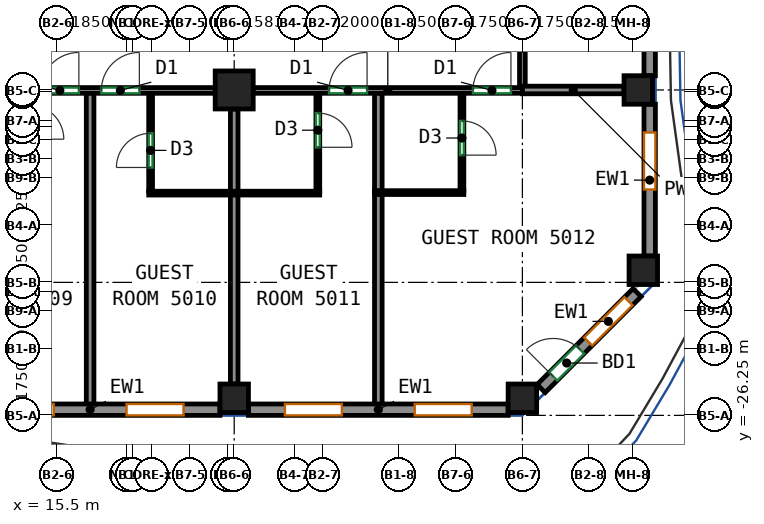
"""IFC4 building model, lengths in metres.
Left out: names, types, materials, properties, quantities, classifications, styles, units other than length and angle.
Written with IfcOpenShell. Run it as: python <this file> out.ifc"""

import sys

from ifc_helpers import new_model, si_unit, direction, frame, frame_2d, origin, origin_2d, place, context, subcontext, project, spatial, rectangle, extrude, source, transform, mapped, element, fill, save


model = new_model("IFC4")
c1 = context("Model", 3, precision=1e-05, world=origin(), true_north=direction((0.0, 1.0)))
c2 = subcontext(c1, "Body", "Model", "MODEL_VIEW")
j1 = project(units=[si_unit("LENGTHUNIT", "METRE"), si_unit("PLANEANGLEUNIT", "RADIAN")], contexts=[c1])
p1 = place(None, origin())
s1 = spatial("IfcSite", under=j1, at=p1, CompositionType="ELEMENT")
p2 = place(p1, origin())
s2 = spatial("IfcBuilding", under=s1, at=p2, CompositionType="ELEMENT")
p3 = place(p2, frame((0.0, 0.0, 206.7)))
s3 = spatial("IfcBuildingStorey", under=s2, at=p3, CompositionType="ELEMENT", Elevation=206.7)
m1 = source(origin(), c2, "Body", "SweptSolid", [
    extrude(rectangle(XDim=0.75, YDim=0.75, at=origin_2d()), origin(), (0.0, 0.0, 1.0), 3.12),
])
p4 = place(p3, frame((20.167, -25.8, 0.0), z_axis=(0.0, 0.0, 1.0), x_axis=(1.0, 0.0, 0.0)))
e1 = element("IfcColumn", 1, at=p4, inside=s3, PredefinedType="COLUMN", context=c2, shape_type="MappedRepresentation", body=[
    mapped(m1, transform((0.0, 0.0, 0.0))),
])
m2 = source(origin(), c2, "Body", "SweptSolid", [
    extrude(rectangle(XDim=1.0, YDim=1.0, at=origin_2d()), origin(), (0.0, 0.0, 1.0), 3.12),
])
p5 = place(p3, frame((20.167, -17.688, 0.0), z_axis=(0.0, 0.0, 1.0), x_axis=(1.0, 0.0, 0.0)))
e2 = element("IfcColumn", 2, at=p5, inside=s3, PredefinedType="COLUMN", context=c2, shape_type="MappedRepresentation", body=[
    mapped(m2, transform((0.0, 0.0, 0.0))),
])
for number, where, z_axis, x_axis in (
    (3, (27.75, -25.8, 0.0), (0.0, 0.0, 1.0), (1.0, 0.0, 0.0)),
    (4, (30.8, -17.688, 0.0), (0.0, 0.0, 1.0), (1.0, 0.0, 0.0)),
    (5, (30.932, -22.432, 0.0), (0.0, 0.0, 1.0), (1.0, 0.0, 0.0)),
):
    element("IfcColumn", number, at=place(p3, frame(where, z_axis=z_axis, x_axis=x_axis)), inside=s3, PredefinedType="COLUMN", context=c2, shape_type="MappedRepresentation", body=[
        mapped(m1, transform((0.0, 0.0, 0.0))),
    ])
m3 = source(origin(), c2, "Body", "SweptSolid", [
    extrude(rectangle(XDim=6.833, YDim=0.3, at=frame_2d((3.417, 0.0))), origin(), (0.0, 0.0, 1.0), 3.12),
])
p6 = place(p3, frame((12.958, -26.1, 0.0), z_axis=(0.0, 0.0, 1.0), x_axis=(1.0, 0.0, 0.0)))
e6 = element("IfcWall", 6, at=p6, inside=s3, PredefinedType="SOLIDWALL", context=c2, shape_type="MappedRepresentation", body=[
    mapped(m3, transform((0.0, 0.0, 0.0))),
])
p7 = place(p6, frame((0.958, 0.0, 0.85)))
e7 = element("IfcOpeningElement", 7, at=p7, cuts=e6, PredefinedType="OPENING", context=c2, shape_type="SweptSolid", body=[
    extrude(rectangle(XDim=1.5, YDim=1.95, at=frame_2d((0.75, 0.975))), frame((0.0, 0.16, 0.0), z_axis=(0.0, -1.0, 0.0), x_axis=(1.0, 0.0, 0.0)), (0.0, 0.0, 1.0), 0.32),
])
p8 = place(p6, frame((4.375, 0.0, 0.85)))
e8 = element("IfcOpeningElement", 8, at=p8, cuts=e6, PredefinedType="OPENING", context=c2, shape_type="SweptSolid", body=[
    extrude(rectangle(XDim=1.5, YDim=1.95, at=frame_2d((0.75, 0.975))), frame((0.0, 0.16, 0.0), z_axis=(0.0, -1.0, 0.0), x_axis=(1.0, 0.0, 0.0)), (0.0, 0.0, 1.0), 0.32),
])
m4 = source(origin(), c2, "Body", "SweptSolid", [
    extrude(rectangle(XDim=6.833, YDim=0.3, at=frame_2d((3.417, 0.0))), origin(), (0.0, 0.0, 1.0), 3.12),
])
p9 = place(p3, frame((20.542, -26.1, 0.0), z_axis=(0.0, 0.0, 1.0), x_axis=(1.0, 0.0, 0.0)))
e9 = element("IfcWall", 9, at=p9, inside=s3, PredefinedType="SOLIDWALL", context=c2, shape_type="MappedRepresentation", body=[
    mapped(m4, transform((0.0, 0.0, 0.0))),
])
p10 = place(p9, frame((0.958, 0.0, 0.85)))
e10 = element("IfcOpeningElement", 10, at=p10, cuts=e9, PredefinedType="OPENING", context=c2, shape_type="SweptSolid", body=[
    extrude(rectangle(XDim=1.5, YDim=1.95, at=frame_2d((0.75, 0.975))), frame((0.0, 0.16, 0.0), z_axis=(0.0, -1.0, 0.0), x_axis=(1.0, 0.0, 0.0)), (0.0, 0.0, 1.0), 0.32),
])
p11 = place(p9, frame((4.375, 0.0, 0.85)))
e11 = element("IfcOpeningElement", 11, at=p11, cuts=e9, PredefinedType="OPENING", context=c2, shape_type="SweptSolid", body=[
    extrude(rectangle(XDim=1.5, YDim=1.95, at=frame_2d((0.75, 0.975))), frame((0.0, 0.16, 0.0), z_axis=(0.0, -1.0, 0.0), x_axis=(1.0, 0.0, 0.0)), (0.0, 0.0, 1.0), 0.32),
])
m5 = source(origin(), c2, "Body", "SweptSolid", [
    extrude(rectangle(XDim=3.571, YDim=0.3, at=frame_2d((1.786, 0.0))), origin(), (0.0, 0.0, 1.0), 3.12),
])
p12 = place(p3, frame((28.244, -25.544, 0.0), z_axis=(0.0, 0.0, 1.0), x_axis=(0.707072595841, 0.707140964879, 0.0)))
e12 = element("IfcWall", 12, at=p12, inside=s3, PredefinedType="SOLIDWALL", context=c2, shape_type="MappedRepresentation", body=[
    mapped(m5, transform((0.0, 0.0, 0.0))),
])
p13 = place(p12, frame((1.75, 0.0, 0.85)))
e13 = element("IfcOpeningElement", 13, at=p13, cuts=e12, PredefinedType="OPENING", context=c2, shape_type="SweptSolid", body=[
    extrude(rectangle(XDim=1.5, YDim=1.95, at=frame_2d((0.75, 0.975))), frame((0.0, 0.16, 0.0), z_axis=(0.0, -1.0, 0.0), x_axis=(1.0, 0.0, 0.0)), (0.0, 0.0, 1.0), 0.32),
])
p14 = place(p12, frame((0.45, 0.0, 0.0)))
e14 = element("IfcOpeningElement", 14, at=p14, cuts=e12, PredefinedType="OPENING", context=c2, shape_type="SweptSolid", body=[
    extrude(rectangle(XDim=1.0, YDim=2.1, at=frame_2d((0.5, 1.05))), frame((0.0, 0.16, 0.0), z_axis=(0.0, -1.0, 0.0), x_axis=(1.0, 0.0, 0.0)), (0.0, 0.0, 1.0), 0.32),
])
m6 = source(origin(), c2, "Body", "SweptSolid", [
    extrude(rectangle(XDim=3.994, YDim=0.3, at=frame_2d((1.997, 0.0))), origin(), (0.0, 0.0, 1.0), 3.12),
])
p15 = place(p3, frame((31.1, -22.057, 0.0), z_axis=(0.0, 0.0, 1.0), x_axis=(0.0, 1.0, 0.0)))
e15 = element("IfcWall", 15, at=p15, inside=s3, PredefinedType="SOLIDWALL", context=c2, shape_type="MappedRepresentation", body=[
    mapped(m6, transform((0.0, 0.0, 0.0))),
])
p16 = place(p15, frame((1.75, 0.0, 0.85)))
e16 = element("IfcOpeningElement", 16, at=p16, cuts=e15, PredefinedType="OPENING", context=c2, shape_type="SweptSolid", body=[
    extrude(rectangle(XDim=1.5, YDim=1.95, at=frame_2d((0.75, 0.975))), frame((0.0, 0.16, 0.0), z_axis=(0.0, -1.0, 0.0), x_axis=(1.0, 0.0, 0.0)), (0.0, 0.0, 1.0), 0.32),
])
m7 = source(origin(), c2, "Body", "SweptSolid", [
    extrude(rectangle(XDim=7.812, YDim=0.3, at=frame_2d((3.906, 0.0))), origin(), (0.0, 0.0, 1.0), 3.12),
])
p17 = place(p3, frame((31.1, -17.312, 0.0), z_axis=(0.0, 0.0, 1.0), x_axis=(0.0, 1.0, 0.0)))
e17 = element("IfcWall", 17, at=p17, inside=s3, PredefinedType="SOLIDWALL", context=c2, shape_type="MappedRepresentation", body=[
    mapped(m7, transform((0.0, 0.0, 0.0))),
])
p18 = place(p17, frame((1.75, 0.0, 0.85)))
e18 = element("IfcOpeningElement", 18, at=p18, cuts=e17, PredefinedType="OPENING", context=c2, shape_type="SweptSolid", body=[
    extrude(rectangle(XDim=1.5, YDim=1.95, at=frame_2d((0.75, 0.975))), frame((0.0, 0.16, 0.0), z_axis=(0.0, -1.0, 0.0), x_axis=(1.0, 0.0, 0.0)), (0.0, 0.0, 1.0), 0.32),
])
p19 = place(p17, frame((5.656, 0.0, 0.85)))
e19 = element("IfcOpeningElement", 19, at=p19, cuts=e17, PredefinedType="OPENING", context=c2, shape_type="SweptSolid", body=[
    extrude(rectangle(XDim=1.5, YDim=1.95, at=frame_2d((0.75, 0.975))), frame((0.0, 0.16, 0.0), z_axis=(0.0, -1.0, 0.0), x_axis=(1.0, 0.0, 0.0)), (0.0, 0.0, 1.0), 0.32),
])
p20 = place(p3, frame((13.083, -17.7, 0.0), z_axis=(0.0, 0.0, 1.0), x_axis=(1.0, 0.0, 0.0)))
e20 = element("IfcWall", 20, at=p20, inside=s3, PredefinedType="PARTITIONING", context=c2, shape_type="SweptSolid", body=[
    extrude(rectangle(XDim=6.584, YDim=0.15, at=frame_2d((3.292, 0.0))), origin(), (0.0, 0.0, 1.0), 3.12),
])
p21 = place(p20, frame((1.996, 0.0, 0.0)))
e21 = element("IfcOpeningElement", 21, at=p21, cuts=e20, PredefinedType="OPENING", context=c2, shape_type="SweptSolid", body=[
    extrude(rectangle(XDim=1.0, YDim=2.1, at=frame_2d((0.5, 1.05))), frame((0.0, 0.085, 0.0), z_axis=(0.0, -1.0, 0.0), x_axis=(1.0, 0.0, 0.0)), (0.0, 0.0, 1.0), 0.17),
])
p22 = place(p20, frame((3.588, 0.0, 0.0)))
e22 = element("IfcOpeningElement", 22, at=p22, cuts=e20, PredefinedType="OPENING", context=c2, shape_type="SweptSolid", body=[
    extrude(rectangle(XDim=1.0, YDim=2.1, at=frame_2d((0.5, 1.05))), frame((0.0, 0.085, 0.0), z_axis=(0.0, -1.0, 0.0), x_axis=(1.0, 0.0, 0.0)), (0.0, 0.0, 1.0), 0.17),
])
p23 = place(p3, frame((20.667, -17.7, 0.0), z_axis=(0.0, 0.0, 1.0), x_axis=(1.0, 0.0, 0.0)))
e23 = element("IfcWall", 23, at=p23, inside=s3, PredefinedType="PARTITIONING", context=c2, shape_type="SweptSolid", body=[
    extrude(rectangle(XDim=7.083, YDim=0.15, at=frame_2d((3.542, 0.0))), origin(), (0.0, 0.0, 1.0), 2.52),
])
p24 = place(p23, frame((1.996, 0.0, 0.0)))
e24 = element("IfcOpeningElement", 24, at=p24, cuts=e23, PredefinedType="OPENING", context=c2, shape_type="SweptSolid", body=[
    extrude(rectangle(XDim=1.0, YDim=2.1, at=frame_2d((0.5, 1.05))), frame((0.0, 0.085, 0.0), z_axis=(0.0, -1.0, 0.0), x_axis=(1.0, 0.0, 0.0)), (0.0, 0.0, 1.0), 0.17),
])
p25 = place(p23, frame((5.782, 0.0, 0.0)))
e25 = element("IfcOpeningElement", 25, at=p25, cuts=e23, PredefinedType="OPENING", context=c2, shape_type="SweptSolid", body=[
    extrude(rectangle(XDim=1.0, YDim=2.1, at=frame_2d((0.5, 1.05))), frame((0.0, 0.085, 0.0), z_axis=(0.0, -1.0, 0.0), x_axis=(1.0, 0.0, 0.0)), (0.0, 0.0, 1.0), 0.17),
])
p26 = place(p3, frame((27.75, -17.598, 0.0), z_axis=(0.0, 0.0, 1.0), x_axis=(0.0, 1.0, 0.0)))
e26 = element("IfcWall", 26, at=p26, inside=s3, PredefinedType="PARTITIONING", context=c2, shape_type="SweptSolid", body=[
    extrude(rectangle(XDim=2.023, YDim=0.15, at=frame_2d((1.011, 0.0))), origin(), (0.0, 0.0, 1.0), 2.52),
])
p27 = place(p3, frame((16.375, -26.0, 0.0), z_axis=(0.0, 0.0, 1.0), x_axis=(0.0, 1.0, 0.0)))
e27 = element("IfcWall", 27, at=p27, inside=s3, PredefinedType="PARTITIONING", context=c2, shape_type="SweptSolid", body=[
    extrude(rectangle(XDim=8.223, YDim=0.2, at=frame_2d((4.111, 0.0))), origin(), (0.0, 0.0, 1.0), 3.12),
])
p28 = place(p3, frame((17.967, -20.352, 0.0), z_axis=(0.0, 0.0, 1.0), x_axis=(0.0, 1.0, 0.0)))
e28 = element("IfcWall", 28, at=p28, inside=s3, PredefinedType="PARTITIONING", context=c2, shape_type="SweptSolid", body=[
    extrude(rectangle(XDim=2.575, YDim=0.1, at=frame_2d((1.288, 0.0))), origin(), (0.0, 0.0, 1.0), 3.12),
])
p29 = place(p28, frame((0.625, 0.0, 0.0)))
e29 = element("IfcOpeningElement", 29, at=p29, cuts=e28, PredefinedType="OPENING", context=c2, shape_type="SweptSolid", body=[
    extrude(rectangle(XDim=0.9, YDim=2.1, at=frame_2d((0.45, 1.05))), frame((0.0, 0.06, 0.0), z_axis=(0.0, -1.0, 0.0), x_axis=(1.0, 0.0, 0.0)), (0.0, 0.0, 1.0), 0.12),
])
p30 = place(p3, frame((17.917, -20.402, 0.0), z_axis=(0.0, 0.0, 1.0), x_axis=(1.0, 0.0, 0.0)))
e30 = element("IfcWall", 30, at=p30, inside=s3, PredefinedType="PARTITIONING", context=c2, shape_type="SweptSolid", body=[
    extrude(rectangle(XDim=4.5, YDim=0.1, at=frame_2d((2.25, 0.0))), origin(), (0.0, 0.0, 1.0), 3.12),
])
p31 = place(p3, frame((20.167, -25.425, 0.0), z_axis=(0.0, 0.0, 1.0), x_axis=(0.0, 1.0, 0.0)))
e31 = element("IfcWall", 31, at=p31, inside=s3, PredefinedType="PARTITIONING", context=c2, shape_type="SweptSolid", body=[
    extrude(rectangle(XDim=4.973, YDim=0.2, at=frame_2d((2.487, 0.0))), origin(), (0.0, 0.0, 1.0), 3.12),
])
p32 = place(p3, frame((20.167, -20.352, 0.0), z_axis=(0.0, 0.0, 1.0), x_axis=(0.0, 1.0, 0.0)))
e32 = element("IfcWall", 32, at=p32, inside=s3, PredefinedType="PARTITIONING", context=c2, shape_type="SweptSolid", body=[
    extrude(rectangle(XDim=2.164, YDim=0.2, at=frame_2d((1.082, 0.0))), origin(), (0.0, 0.0, 1.0), 3.12),
])
p33 = place(p3, frame((22.367, -17.777, 0.0), z_axis=(0.0, 0.0, 1.0), x_axis=(0.0, -1.0, 0.0)))
e33 = element("IfcWall", 33, at=p33, inside=s3, PredefinedType="PARTITIONING", context=c2, shape_type="SweptSolid", body=[
    extrude(rectangle(XDim=2.575, YDim=0.1, at=frame_2d((1.288, 0.0))), origin(), (0.0, 0.0, 1.0), 3.12),
])
p34 = place(p33, frame((0.519, 0.0, 0.0)))
e34 = element("IfcOpeningElement", 34, at=p34, cuts=e33, PredefinedType="OPENING", context=c2, shape_type="SweptSolid", body=[
    extrude(rectangle(XDim=0.9, YDim=2.1, at=frame_2d((0.45, 1.05))), frame((0.0, 0.06, 0.0), z_axis=(0.0, -1.0, 0.0), x_axis=(1.0, 0.0, 0.0)), (0.0, 0.0, 1.0), 0.12),
])
p35 = place(p3, frame((23.959, -26.0, 0.0), z_axis=(0.0, 0.0, 1.0), x_axis=(0.0, 1.0, 0.0)))
e35 = element("IfcWall", 35, at=p35, inside=s3, PredefinedType="PARTITIONING", context=c2, shape_type="SweptSolid", body=[
    extrude(rectangle(XDim=5.572, YDim=0.2, at=frame_2d((2.786, 0.0))), origin(), (0.0, 0.0, 1.0), 3.12),
])
p36 = place(p3, frame((23.959, -20.348, 0.0), z_axis=(0.0, 0.0, 1.0), x_axis=(0.0, 1.0, 0.0)))
e36 = element("IfcWall", 36, at=p36, inside=s3, PredefinedType="PARTITIONING", context=c2, shape_type="SweptSolid", body=[
    extrude(rectangle(XDim=2.571, YDim=0.2, at=frame_2d((1.285, 0.0))), origin(), (0.0, 0.0, 1.0), 3.12),
])
p37 = place(p3, frame((23.859, -20.388, 0.0), z_axis=(0.0, 0.0, 1.0), x_axis=(1.0, 0.0, 0.0)))
e37 = element("IfcWall", 37, at=p37, inside=s3, PredefinedType="PARTITIONING", context=c2, shape_type="SweptSolid", body=[
    extrude(rectangle(XDim=2.35, YDim=0.1, at=frame_2d((1.175, 0.0))), origin(), (0.0, 0.0, 1.0), 3.12),
])
p38 = place(p3, frame((26.159, -17.777, 0.0), z_axis=(0.0, 0.0, 1.0), x_axis=(0.0, -1.0, 0.0)))
e38 = element("IfcWall", 38, at=p38, inside=s3, PredefinedType="PARTITIONING", context=c2, shape_type="SweptSolid", body=[
    extrude(rectangle(XDim=2.561, YDim=0.1, at=frame_2d((1.28, 0.0))), origin(), (0.0, 0.0, 1.0), 3.12),
])
p39 = place(p38, frame((0.725, 0.0, 0.0)))
e39 = element("IfcOpeningElement", 39, at=p39, cuts=e38, PredefinedType="OPENING", context=c2, shape_type="SweptSolid", body=[
    extrude(rectangle(XDim=0.9, YDim=2.1, at=frame_2d((0.45, 1.05))), frame((0.0, 0.06, 0.0), z_axis=(0.0, -1.0, 0.0), x_axis=(1.0, 0.0, 0.0)), (0.0, 0.0, 1.0), 0.12),
])
p40 = place(p3, frame((27.752, -17.688, 0.0), z_axis=(0.0, 0.0, 1.0), x_axis=(1.0, 0.0, 0.0)))
e40 = element("IfcWall", 40, at=p40, inside=s3, PredefinedType="PARTITIONING", context=c2, shape_type="SweptSolid", body=[
    extrude(rectangle(XDim=2.673, YDim=0.2, at=frame_2d((1.336, 0.0))), origin(), (0.0, 0.0, 1.0), 2.52),
])
p41 = place(p7, origin())
e41 = element("IfcWindow", 41, at=p41, inside=s3, PartitioningType="SINGLE_PANEL", PredefinedType="WINDOW", context=c2, shape_type="SweptSolid", body=[
    extrude(rectangle(XDim=1.5, YDim=1.95, at=frame_2d((0.75, 0.975))), frame((0.0, 0.03, 0.0), z_axis=(0.0, -1.0, 0.0), x_axis=(1.0, 0.0, 0.0)), (0.0, 0.0, 1.0), 0.06),
])
fill(e7, e41)
p42 = place(p8, origin())
e42 = element("IfcWindow", 42, at=p42, inside=s3, PartitioningType="SINGLE_PANEL", PredefinedType="WINDOW", context=c2, shape_type="SweptSolid", body=[
    extrude(rectangle(XDim=1.5, YDim=1.95, at=frame_2d((0.75, 0.975))), frame((0.0, 0.03, 0.0), z_axis=(0.0, -1.0, 0.0), x_axis=(1.0, 0.0, 0.0)), (0.0, 0.0, 1.0), 0.06),
])
fill(e8, e42)
p43 = place(p10, origin())
e43 = element("IfcWindow", 43, at=p43, inside=s3, PartitioningType="SINGLE_PANEL", PredefinedType="WINDOW", context=c2, shape_type="SweptSolid", body=[
    extrude(rectangle(XDim=1.5, YDim=1.95, at=frame_2d((0.75, 0.975))), frame((0.0, 0.03, 0.0), z_axis=(0.0, -1.0, 0.0), x_axis=(1.0, 0.0, 0.0)), (0.0, 0.0, 1.0), 0.06),
])
fill(e10, e43)
p44 = place(p11, origin())
e44 = element("IfcWindow", 44, at=p44, inside=s3, PartitioningType="SINGLE_PANEL", PredefinedType="WINDOW", context=c2, shape_type="SweptSolid", body=[
    extrude(rectangle(XDim=1.5, YDim=1.95, at=frame_2d((0.75, 0.975))), frame((0.0, 0.03, 0.0), z_axis=(0.0, -1.0, 0.0), x_axis=(1.0, 0.0, 0.0)), (0.0, 0.0, 1.0), 0.06),
])
fill(e11, e44)
p45 = place(p13, origin())
e45 = element("IfcWindow", 45, at=p45, inside=s3, PartitioningType="SINGLE_PANEL", PredefinedType="WINDOW", context=c2, shape_type="SweptSolid", body=[
    extrude(rectangle(XDim=1.5, YDim=1.95, at=frame_2d((0.75, 0.975))), frame((0.0, 0.03, 0.0), z_axis=(0.0, -1.0, 0.0), x_axis=(1.0, 0.0, 0.0)), (0.0, 0.0, 1.0), 0.06),
])
fill(e13, e45)
p46 = place(p14, origin())
e46 = element("IfcDoor", 46, at=p46, inside=s3, OperationType="SINGLE_SWING_LEFT", PredefinedType="DOOR", context=c2, shape_type="SweptSolid", body=[
    extrude(rectangle(XDim=1.0, YDim=2.1, at=frame_2d((0.5, 1.05))), frame((0.0, 0.025, 0.0), z_axis=(0.0, -1.0, 0.0), x_axis=(1.0, 0.0, 0.0)), (0.0, 0.0, 1.0), 0.05),
])
fill(e14, e46)
p47 = place(p16, origin())
e47 = element("IfcWindow", 47, at=p47, inside=s3, PartitioningType="SINGLE_PANEL", PredefinedType="WINDOW", context=c2, shape_type="SweptSolid", body=[
    extrude(rectangle(XDim=1.5, YDim=1.95, at=frame_2d((0.75, 0.975))), frame((0.0, 0.03, 0.0), z_axis=(0.0, -1.0, 0.0), x_axis=(1.0, 0.0, 0.0)), (0.0, 0.0, 1.0), 0.06),
])
fill(e16, e47)
p48 = place(p29, origin())
e48 = element("IfcDoor", 48, at=p48, inside=s3, OperationType="SINGLE_SWING_LEFT", PredefinedType="DOOR", context=c2, shape_type="SweptSolid", body=[
    extrude(rectangle(XDim=0.9, YDim=2.1, at=frame_2d((0.45, 1.05))), frame((0.0, 0.025, 0.0), z_axis=(0.0, -1.0, 0.0), x_axis=(1.0, 0.0, 0.0)), (0.0, 0.0, 1.0), 0.05),
])
fill(e29, e48)
p49 = place(p39, origin())
e49 = element("IfcDoor", 49, at=p49, inside=s3, OperationType="SINGLE_SWING_RIGHT", PredefinedType="DOOR", context=c2, shape_type="SweptSolid", body=[
    extrude(rectangle(XDim=0.9, YDim=2.1, at=frame_2d((0.45, 1.05))), frame((0.0, 0.025, 0.0), z_axis=(0.0, -1.0, 0.0), x_axis=(1.0, 0.0, 0.0)), (0.0, 0.0, 1.0), 0.05),
])
fill(e39, e49)
p50 = place(p34, origin())
e50 = element("IfcDoor", 50, at=p50, inside=s3, OperationType="SINGLE_SWING_RIGHT", PredefinedType="DOOR", context=c2, shape_type="SweptSolid", body=[
    extrude(rectangle(XDim=0.9, YDim=2.1, at=frame_2d((0.45, 1.05))), frame((0.0, 0.025, 0.0), z_axis=(0.0, -1.0, 0.0), x_axis=(1.0, 0.0, 0.0)), (0.0, 0.0, 1.0), 0.05),
])
fill(e34, e50)
p51 = place(p21, origin())
e51 = element("IfcDoor", 51, at=p51, inside=s3, OperationType="SINGLE_SWING_RIGHT", PredefinedType="DOOR", context=c2, shape_type="SweptSolid", body=[
    extrude(rectangle(XDim=1.0, YDim=2.1, at=frame_2d((0.5, 1.05))), frame((0.0, 0.025, 0.0), z_axis=(0.0, -1.0, 0.0), x_axis=(1.0, 0.0, 0.0)), (0.0, 0.0, 1.0), 0.05),
])
fill(e21, e51)
p52 = place(p22, origin())
e52 = element("IfcDoor", 52, at=p52, inside=s3, OperationType="SINGLE_SWING_RIGHT", PredefinedType="DOOR", context=c2, shape_type="SweptSolid", body=[
    extrude(rectangle(XDim=1.0, YDim=2.1, at=frame_2d((0.5, 1.05))), frame((0.0, 0.025, 0.0), z_axis=(0.0, -1.0, 0.0), x_axis=(1.0, 0.0, 0.0)), (0.0, 0.0, 1.0), 0.05),
])
fill(e22, e52)
p53 = place(p24, origin())
e53 = element("IfcDoor", 53, at=p53, inside=s3, OperationType="SINGLE_SWING_RIGHT", PredefinedType="DOOR", context=c2, shape_type="SweptSolid", body=[
    extrude(rectangle(XDim=1.0, YDim=2.1, at=frame_2d((0.5, 1.05))), frame((0.0, 0.025, 0.0), z_axis=(0.0, -1.0, 0.0), x_axis=(1.0, 0.0, 0.0)), (0.0, 0.0, 1.0), 0.05),
])
fill(e24, e53)
p54 = place(p25, origin())
e54 = element("IfcDoor", 54, at=p54, inside=s3, OperationType="SINGLE_SWING_RIGHT", PredefinedType="DOOR", context=c2, shape_type="SweptSolid", body=[
    extrude(rectangle(XDim=1.0, YDim=2.1, at=frame_2d((0.5, 1.05))), frame((0.0, 0.025, 0.0), z_axis=(0.0, -1.0, 0.0), x_axis=(1.0, 0.0, 0.0)), (0.0, 0.0, 1.0), 0.05),
])
fill(e25, e54)
save(model, sys.argv[1])
